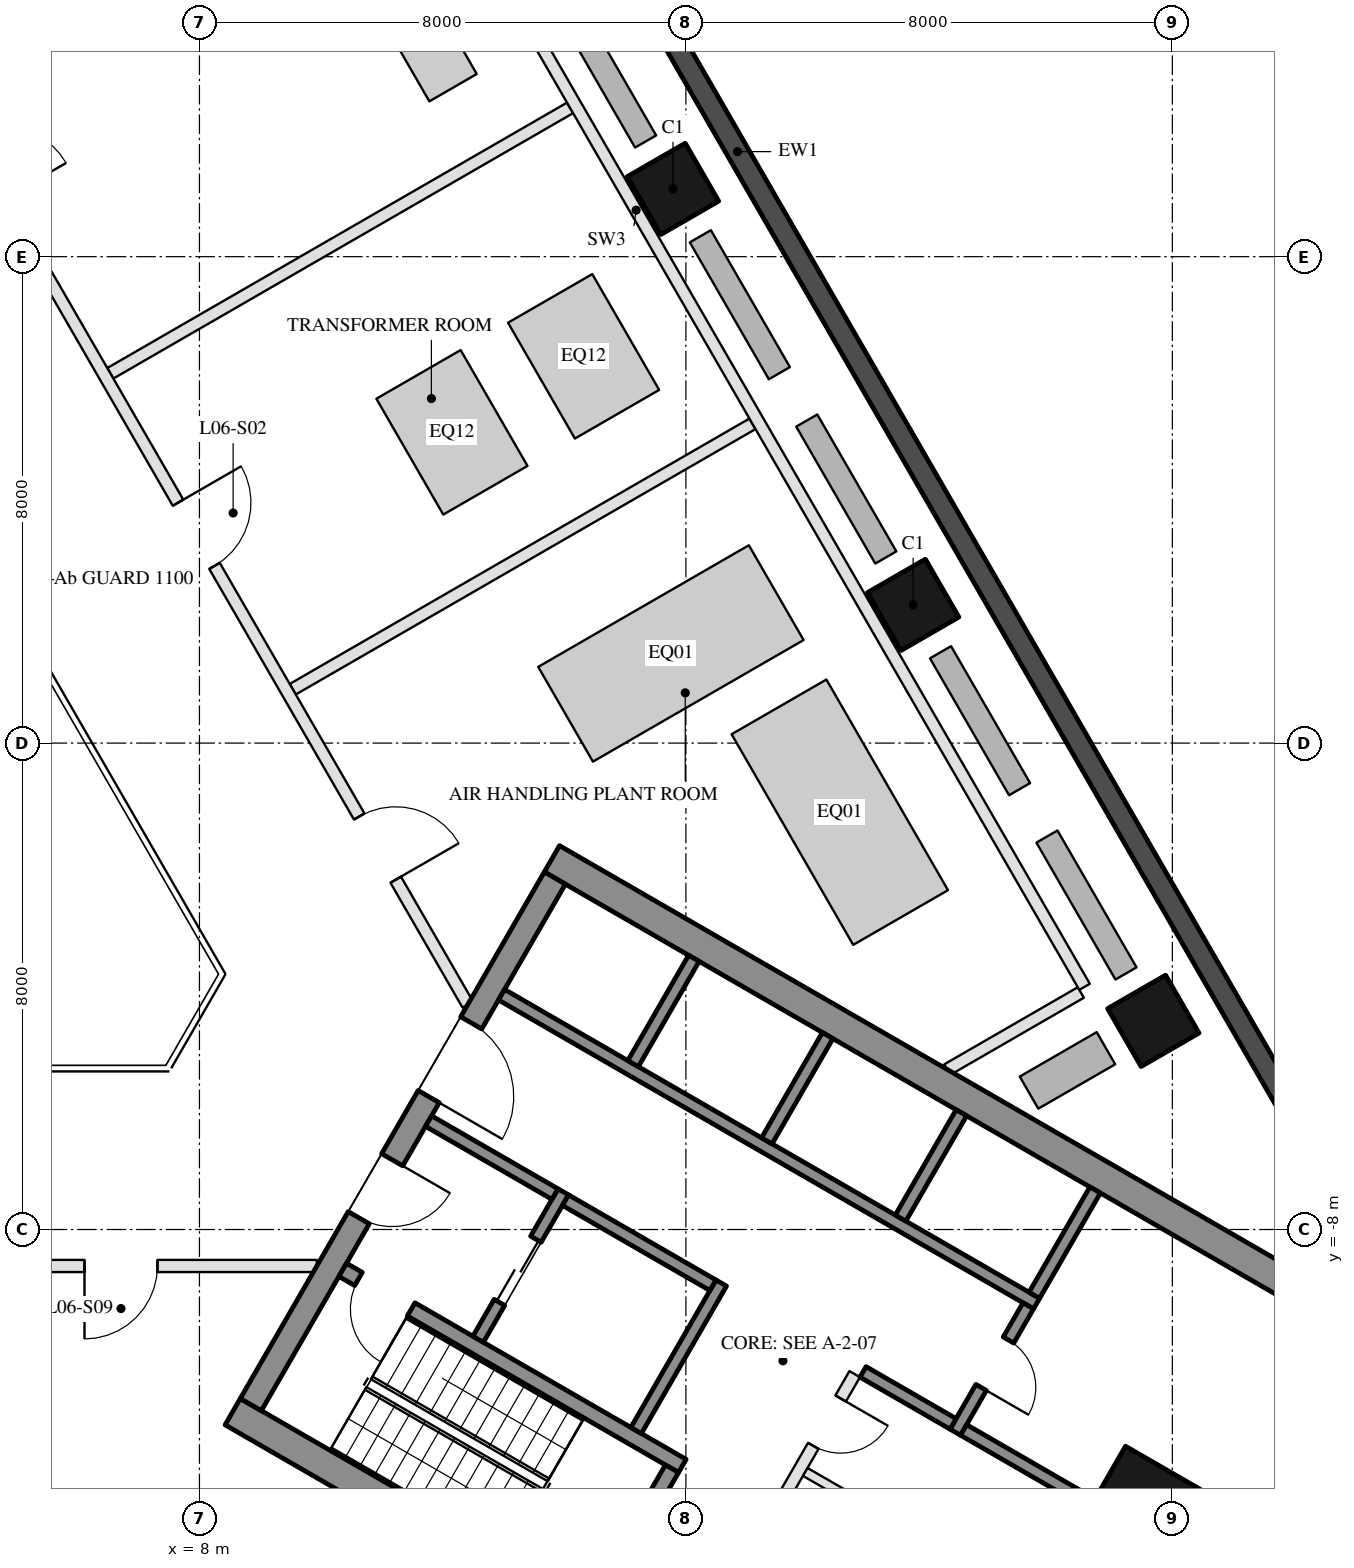
"""IFC4 building model, lengths in metres.
Left out: names, types, materials, properties, quantities, classifications, styles, units other than length and angle.
Written with IfcOpenShell. Run it as: python <this file> out.ifc"""

import sys

from ifc_helpers import new_model, si_unit, direction, frame, frame_2d, origin, origin_2d, place, context, subcontext, project, spatial, rectangle, hollow_rectangle, extrude, boolean, halfspace, element, fill, save


model = new_model("IFC4")
c1 = context("Model", 3, precision=1e-05, world=origin(), true_north=direction((0.0, 1.0)))
c2 = subcontext(c1, "Body", "Model", "MODEL_VIEW")
j1 = project(units=[si_unit("LENGTHUNIT", "METRE"), si_unit("PLANEANGLEUNIT", "RADIAN")], contexts=[c1])
p1 = place(None, origin())
s1 = spatial("IfcSite", under=j1, at=p1, CompositionType="ELEMENT")
p2 = place(p1, origin())
s2 = spatial("IfcBuilding", under=s1, at=p2, CompositionType="ELEMENT")
p3 = place(p2, frame((0.0, 0.0, 37.5)))
s3 = spatial("IfcBuildingStorey", under=s2, at=p3, CompositionType="ELEMENT", Elevation=37.5)
p4 = place(p3, frame((23.688, -4.568, 0.0), z_axis=(0.0, 0.0, 1.0), x_axis=(-0.5, 0.866025403784, 0.0)))
e1 = element("IfcColumn", 1, at=p4, inside=s3, PredefinedType="COLUMN", context=c2, shape_type="SweptSolid", body=[
    boolean("DIFFERENCE", extrude(hollow_rectangle(XDim=1.1, YDim=1.1, WallThickness=0.05, at=origin_2d()), origin(), (0.0, 0.0, 1.0), 4.5), halfspace(frame((0.0, 0.0, 0.007), z_axis=(0.0, 0.0, 1.0), x_axis=(1.0, 0.0, 0.0)), True)),
])
p5 = place(p3, frame((19.738, 2.273, 0.0), z_axis=(0.0, 0.0, 1.0), x_axis=(-0.5, 0.866025403784, 0.0)))
e2 = element("IfcColumn", 2, at=p5, inside=s3, PredefinedType="COLUMN", context=c2, shape_type="SweptSolid", body=[
    boolean("DIFFERENCE", extrude(hollow_rectangle(XDim=1.1, YDim=1.1, WallThickness=0.05, at=origin_2d()), origin(), (0.0, 0.0, 1.0), 4.5), halfspace(frame((0.0, 0.0, 0.006), z_axis=(0.0, 0.0, 1.0), x_axis=(1.0, 0.0, 0.0)), True)),
])
p6 = place(p3, frame((15.788, 9.115, 0.0), z_axis=(0.0, 0.0, 1.0), x_axis=(-0.5, 0.866025403784, 0.0)))
e3 = element("IfcColumn", 3, at=p6, inside=s3, PredefinedType="COLUMN", context=c2, shape_type="SweptSolid", body=[
    boolean("DIFFERENCE", extrude(hollow_rectangle(XDim=1.1, YDim=1.1, WallThickness=0.05, at=origin_2d()), origin(), (0.0, 0.0, 1.0), 4.5), halfspace(frame((0.0, 0.0, 0.006), z_axis=(0.0, 0.0, 1.0), x_axis=(1.0, 0.0, 0.0)), True)),
])
p7 = place(p3, frame((23.556, -13.6, 0.0), z_axis=(0.0, 0.0, 1.0), x_axis=(0.5, 0.866025403784, 0.0)))
e4 = element("IfcColumn", 4, at=p7, inside=s3, PredefinedType="COLUMN", context=c2, shape_type="SweptSolid", body=[
    extrude(hollow_rectangle(XDim=3.2, YDim=2.6, WallThickness=0.08, at=origin_2d()), origin(), (0.0, 0.0, 1.0), 4.5),
])
p8 = place(p3, frame((23.427, -16.792, 0.0), z_axis=(0.0, 0.0, 1.0), x_axis=(0.499986410639, 0.866033249463, 0.0)))
e5 = element("IfcWall", 5, at=p8, inside=s3, PredefinedType="SOLIDWALL", context=c2, shape_type="SweptSolid", body=[
    extrude(rectangle(XDim=5.658, YDim=0.35, at=frame_2d((2.829, 0.0))), origin(), (0.0, 0.0, 1.0), 4.2),
])
p9 = place(p3, frame((26.256, -6.567, 0.0), z_axis=(0.0, 0.0, 1.0), x_axis=(-0.499998380999, 0.866026338513, 0.0)))
e6 = element("IfcWall", 6, at=p9, inside=s3, PredefinedType="SOLIDWALL", context=c2, shape_type="SweptSolid", body=[
    extrude(rectangle(XDim=37.631, YDim=0.35, at=frame_2d((18.816, 0.0))), origin(), (0.0, 0.0, 1.0), 4.2),
])
for number, where, z_axis, x_axis in (
    (7, (8.547, -10.997, 0.0), (0.0, 0.0, 1.0), (0.866, -0.5, 0.0)),
    (8, (13.797, -1.903, 0.0), (0.0, 0.0, 1.0), (0.866, -0.5, 0.0)),
):
    element("IfcWall", number, at=place(p3, frame(where, z_axis=z_axis, x_axis=x_axis)), inside=s3, PredefinedType="SHEAR", context=c2, shape_type="SweptSolid", body=[
        extrude(rectangle(XDim=14.837, YDim=0.5, at=frame_2d((7.418, 0.0))), origin(), (0.0, 0.0, 1.0), 4.2),
    ])
p10 = place(p3, frame((8.845, -10.88, 0.0), z_axis=(0.0, 0.0, 1.0), x_axis=(0.500004234368, 0.866022959057, 0.0)))
e9 = element("IfcWall", 9, at=p10, inside=s3, PredefinedType="SHEAR", context=c2, shape_type="SweptSolid", body=[
    extrude(rectangle(XDim=10.0, YDim=0.4, at=frame_2d((5.0, 0.0))), origin(), (0.0, 0.0, 1.0), 4.2),
])
p11 = place(p10, frame((3.55, 0.0, 0.0)))
e10 = element("IfcOpeningElement", 10, at=p11, cuts=e9, PredefinedType="OPENING", context=c2, shape_type="SweptSolid", body=[
    extrude(rectangle(XDim=1.1, YDim=2.1, at=frame_2d((0.55, 1.05))), frame((0.0, 0.21, 0.0), z_axis=(0.0, -1.0, 0.0), x_axis=(1.0, 0.0, 0.0)), (0.0, 0.0, 1.0), 0.42),
])
p12 = place(p10, frame((5.85, 0.0, 0.0)))
e11 = element("IfcOpeningElement", 11, at=p12, cuts=e9, PredefinedType="OPENING", context=c2, shape_type="SweptSolid", body=[
    extrude(rectangle(XDim=1.4, YDim=2.1, at=frame_2d((0.7, 1.05))), frame((0.0, 0.21, 0.0), z_axis=(0.0, -1.0, 0.0), x_axis=(1.0, 0.0, 0.0)), (0.0, 0.0, 1.0), 0.42),
])
p13 = place(p3, frame((10.356, -8.664, 0.0), z_axis=(0.0, 0.0, 1.0), x_axis=(0.866028629588, -0.499994412703, 0.0)))
e12 = element("IfcWall", 12, at=p13, inside=s3, PredefinedType="SHEAR", context=c2, shape_type="SweptSolid", body=[
    extrude(rectangle(XDim=6.45, YDim=0.25, at=frame_2d((3.225, 0.0))), origin(), (0.0, 0.0, 1.0), 4.2),
])
p14 = place(p13, frame((0.3, 0.0, 0.0)))
e13 = element("IfcOpeningElement", 13, at=p14, cuts=e12, PredefinedType="OPENING", context=c2, shape_type="SweptSolid", body=[
    extrude(rectangle(XDim=1.0, YDim=2.1, at=frame_2d((0.5, 1.05))), frame((0.0, 0.135, 0.0), z_axis=(0.0, -1.0, 0.0), x_axis=(1.0, 0.0, 0.0)), (0.0, 0.0, 1.0), 0.27),
])
p15 = place(p3, frame((14.496, -14.143, 0.0), z_axis=(0.0, 0.0, 1.0), x_axis=(0.500062241894, 0.865989465428, 0.0)))
e14 = element("IfcWall", 14, at=p15, inside=s3, PredefinedType="SHEAR", context=c2, shape_type="SweptSolid", body=[
    extrude(rectangle(XDim=2.55, YDim=0.25, at=frame_2d((1.275, 0.0))), origin(), (0.0, 0.0, 1.0), 4.2),
])
p16 = place(p3, frame((15.181, -11.305, 0.0), z_axis=(0.0, 0.0, 1.0), x_axis=(0.49994636267, 0.866056369097, 0.0)))
e15 = element("IfcWall", 15, at=p16, inside=s3, PredefinedType="SHEAR", context=c2, shape_type="SweptSolid", body=[
    extrude(rectangle(XDim=2.8, YDim=0.2, at=frame_2d((1.4, 0.0))), origin(), (0.0, 0.0, 1.0), 4.2),
])
p17 = place(p3, frame((12.583, -9.805, 0.0), z_axis=(0.0, 0.0, 1.0), x_axis=(0.49994636267, 0.866056369097, 0.0)))
e16 = element("IfcWall", 16, at=p17, inside=s3, PredefinedType="SHEAR", context=c2, shape_type="SweptSolid", body=[
    extrude(rectangle(XDim=2.8, YDim=0.2, at=frame_2d((1.4, 0.0))), origin(), (0.0, 0.0, 1.0), 4.2),
])
p18 = place(p17, frame((0.7, 0.0, 0.0)))
e17 = element("IfcOpeningElement", 17, at=p18, cuts=e16, PredefinedType="OPENING", context=c2, shape_type="SweptSolid", body=[
    extrude(rectangle(XDim=1.2, YDim=2.1, at=frame_2d((0.6, 1.05))), frame((0.0, 0.11, 0.0), z_axis=(0.0, -1.0, 0.0), x_axis=(1.0, 0.0, 0.0)), (0.0, 0.0, 1.0), 0.22),
])
p19 = place(p3, frame((11.768, -6.217, 0.0), z_axis=(0.0, 0.0, 1.0), x_axis=(0.866050077142, -0.499957262057, 0.0)))
e18 = element("IfcWall", 18, at=p19, inside=s3, PredefinedType="SHEAR", context=c2, shape_type="SweptSolid", body=[
    extrude(rectangle(XDim=2.4, YDim=0.2, at=frame_2d((1.2, 0.0))), origin(), (0.0, 0.0, 1.0), 4.2),
])
p20 = place(p3, frame((14.02, -7.517, 0.0), z_axis=(0.0, 0.0, 1.0), x_axis=(0.866034573852, -0.49998411664, 0.0)))
e19 = element("IfcWall", 19, at=p20, inside=s3, PredefinedType="SHEAR", context=c2, shape_type="SweptSolid", body=[
    extrude(rectangle(XDim=2.8, YDim=0.2, at=frame_2d((1.4, 0.0))), origin(), (0.0, 0.0, 1.0), 4.2),
])
p21 = place(p3, frame((12.968, -4.138, 0.0), z_axis=(0.0, 0.0, 1.0), x_axis=(0.866028328073, -0.49999493495, 0.0)))
e20 = element("IfcWall", 20, at=p21, inside=s3, PredefinedType="SHEAR", context=c2, shape_type="SweptSolid", body=[
    extrude(rectangle(XDim=10.16, YDim=0.2, at=frame_2d((5.08, 0.0))), origin(), (0.0, 0.0, 1.0), 4.2),
])
p22 = place(p3, frame((20.43, -11.333, 0.0), z_axis=(0.0, 0.0, 1.0), x_axis=(0.500001309137, 0.866024647952, 0.0)))
e21 = element("IfcWall", 21, at=p22, inside=s3, PredefinedType="SHEAR", context=c2, shape_type="SweptSolid", body=[
    extrude(rectangle(XDim=2.4, YDim=0.2, at=frame_2d((1.2, 0.0))), origin(), (0.0, 0.0, 1.0), 4.2),
])
p23 = place(p22, frame((0.85, 0.0, 0.0)))
e22 = element("IfcOpeningElement", 22, at=p23, cuts=e21, PredefinedType="OPENING", context=c2, shape_type="SweptSolid", body=[
    extrude(rectangle(XDim=0.9, YDim=2.1, at=frame_2d((0.45, 1.05))), frame((0.0, 0.11, 0.0), z_axis=(0.0, -1.0, 0.0), x_axis=(1.0, 0.0, 0.0)), (0.0, 0.0, 1.0), 0.22),
])
p24 = place(p3, frame((18.913, -10.342, 0.0), z_axis=(0.0, 0.0, 1.0), x_axis=(0.866038183914, -0.499977863513, 0.0)))
e23 = element("IfcWall", 23, at=p24, inside=s3, PredefinedType="SHEAR", context=c2, shape_type="SweptSolid", body=[
    extrude(rectangle(XDim=1.71, YDim=0.2, at=frame_2d((0.855, 0.0))), origin(), (0.0, 0.0, 1.0), 4.2),
])
for number, where, z_axis, x_axis in (
    (24, (15.131, -5.272, 0.0), (0.0, 0.0, 1.0), (0.5, 0.866, 0.0)),
    (25, (17.331, -6.542, 0.0), (0.0, 0.0, 1.0), (0.5, 0.866, 0.0)),
    (26, (19.531, -7.812, 0.0), (0.0, 0.0, 1.0), (0.5, 0.866, 0.0)),
    (27, (21.73, -9.082, 0.0), (0.0, 0.0, 1.0), (0.5, 0.866, 0.0)),
):
    element("IfcWall", number, at=place(p3, frame(where, z_axis=z_axis, x_axis=x_axis)), inside=s3, PredefinedType="SHEAR", context=c2, shape_type="SweptSolid", body=[
        extrude(rectangle(XDim=2.0, YDim=0.2, at=frame_2d((1.0, 0.0))), origin(), (0.0, 0.0, 1.0), 4.2),
    ])
p25 = place(p3, frame((20.567, -11.297, 0.0), z_axis=(0.0, 0.0, 1.0), x_axis=(0.866048967903, -0.499959183527, 0.0)))
e28 = element("IfcWall", 28, at=p25, inside=s3, PredefinedType="SHEAR", context=c2, shape_type="SweptSolid", body=[
    extrude(rectangle(XDim=2.44, YDim=0.2, at=frame_2d((1.22, 0.0))), origin(), (0.0, 0.0, 1.0), 4.2),
])
p26 = place(p3, frame((16.076, -15.055, 0.0), z_axis=(0.0, 0.0, 1.0), x_axis=(0.499995103361, 0.866028230842, 0.0)))
e29 = element("IfcWall", 29, at=p26, inside=s3, PredefinedType="PARTITIONING", context=c2, shape_type="SweptSolid", body=[
    extrude(rectangle(XDim=5.4, YDim=0.2, at=frame_2d((2.7, 0.0))), origin(), (0.0, 0.0, 1.0), 4.2),
])
p27 = place(p26, frame((2.163, 0.0, 0.0)))
e30 = element("IfcOpeningElement", 30, at=p27, cuts=e29, PredefinedType="OPENING", context=c2, shape_type="SweptSolid", body=[
    extrude(rectangle(XDim=0.9, YDim=2.1, at=frame_2d((0.45, 1.05))), frame((0.0, 0.11, 0.0), z_axis=(0.0, -1.0, 0.0), x_axis=(1.0, 0.0, 0.0)), (0.0, 0.0, 1.0), 0.22),
])
p28 = place(p26, frame((4.038, 0.0, 0.0)))
e31 = element("IfcOpeningElement", 31, at=p28, cuts=e29, PredefinedType="OPENING", context=c2, shape_type="SweptSolid", body=[
    extrude(rectangle(XDim=0.9, YDim=2.1, at=frame_2d((0.45, 1.05))), frame((0.0, 0.11, 0.0), z_axis=(0.0, -1.0, 0.0), x_axis=(1.0, 0.0, 0.0)), (0.0, 0.0, 1.0), 0.22),
])
p29 = place(p3, frame((17.963, -11.987, 0.0), z_axis=(0.0, 0.0, 1.0), x_axis=(0.866013608182, -0.500020430026, 0.0)))
e32 = element("IfcWall", 32, at=p29, inside=s3, PredefinedType="PARTITIONING", context=c2, shape_type="SweptSolid", body=[
    extrude(rectangle(XDim=4.35, YDim=0.15, at=frame_2d((2.175, 0.0))), origin(), (0.0, 0.0, 1.0), 4.2),
])
p30 = place(p3, frame((-9.93, -8.6, 0.0), z_axis=(0.0, 0.0, 1.0), x_axis=(1.0, 0.0, 0.0)))
e33 = element("IfcWall", 33, at=p30, inside=s3, PredefinedType="PARTITIONING", context=c2, shape_type="SweptSolid", body=[
    extrude(rectangle(XDim=19.861, YDim=0.2, at=frame_2d((9.93, 0.0))), origin(), (0.0, 0.0, 1.0), 3.41),
])
p31 = place(p30, frame((2.871, 0.0, 0.0)))
e34 = element("IfcOpeningElement", 34, at=p31, cuts=e33, PredefinedType="OPENING", context=c2, shape_type="SweptSolid", body=[
    extrude(rectangle(XDim=1.2, YDim=2.1, at=frame_2d((0.6, 1.05))), frame((0.0, 0.11, 0.0), z_axis=(0.0, -1.0, 0.0), x_axis=(1.0, 0.0, 0.0)), (0.0, 0.0, 1.0), 0.22),
])
p32 = place(p30, frame((9.581, 0.0, 0.0)))
e35 = element("IfcOpeningElement", 35, at=p32, cuts=e33, PredefinedType="OPENING", context=c2, shape_type="SweptSolid", body=[
    extrude(rectangle(XDim=1.2, YDim=2.1, at=frame_2d((0.6, 1.05))), frame((0.0, 0.11, 0.0), z_axis=(0.0, -1.0, 0.0), x_axis=(1.0, 0.0, 0.0)), (0.0, 0.0, 1.0), 0.22),
])
p33 = place(p30, frame((16.04, 0.0, 0.0)))
e36 = element("IfcOpeningElement", 36, at=p33, cuts=e33, PredefinedType="OPENING", context=c2, shape_type="SweptSolid", body=[
    extrude(rectangle(XDim=1.2, YDim=2.1, at=frame_2d((0.6, 1.05))), frame((0.0, 0.11, 0.0), z_axis=(0.0, -1.0, 0.0), x_axis=(1.0, 0.0, 0.0)), (0.0, 0.0, 1.0), 0.22),
])
p34 = place(p3, frame((22.495, -4.102, 0.0), z_axis=(0.0, 0.0, 1.0), x_axis=(-0.866065287345, -0.499930913282, 0.0)))
e37 = element("IfcWall", 37, at=p34, inside=s3, PredefinedType="PARTITIONING", context=c2, shape_type="SweptSolid", body=[
    extrude(rectangle(XDim=2.534, YDim=0.2, at=frame_2d((1.267, 0.0))), origin(), (0.0, 0.0, 1.0), 4.2),
])
p35 = place(p3, frame((17.095, 5.251, 0.0), z_axis=(0.0, 0.0, 1.0), x_axis=(-0.866023051915, -0.500004073536, 0.0)))
e38 = element("IfcWall", 38, at=p35, inside=s3, PredefinedType="PARTITIONING", context=c2, shape_type="SweptSolid", body=[
    extrude(rectangle(XDim=8.73, YDim=0.2, at=frame_2d((4.365, 0.0))), origin(), (0.0, 0.0, 1.0), 3.41),
])
p36 = place(p3, frame((14.095, 10.447, 0.0), z_axis=(0.0, 0.0, 1.0), x_axis=(-0.866023051915, -0.500004073536, 0.0)))
e39 = element("IfcWall", 39, at=p36, inside=s3, PredefinedType="PARTITIONING", context=c2, shape_type="SweptSolid", body=[
    extrude(rectangle(XDim=8.73, YDim=0.2, at=frame_2d((4.365, 0.0))), origin(), (0.0, 0.0, 1.0), 4.2),
])
p37 = place(p3, frame((22.556, -4.009, 0.0), z_axis=(0.0, 0.0, 1.0), x_axis=(-0.500002084189, 0.866024200474, 0.0)))
e40 = element("IfcWall", 40, at=p37, inside=s3, PredefinedType="PARTITIONING", context=c2, shape_type="SweptSolid", body=[
    extrude(rectangle(XDim=29.5, YDim=0.2, at=frame_2d((14.75, 0.0))), origin(), (0.0, 0.0, 1.0), 3.41),
])
p38 = place(p3, frame((12.413, -4.3, 0.0), z_axis=(0.0, 0.0, 1.0), x_axis=(-0.50000478328, 0.866022642139, 0.0)))
e41 = element("IfcWall", 41, at=p38, inside=s3, PredefinedType="PARTITIONING", context=c2, shape_type="SweptSolid", body=[
    extrude(rectangle(XDim=19.861, YDim=0.2, at=frame_2d((9.931, 0.0))), origin(), (0.0, 0.0, 1.0), 3.41),
])
p39 = place(p38, frame((2.371, 0.0, 0.0)))
e42 = element("IfcOpeningElement", 42, at=p39, cuts=e41, PredefinedType="OPENING", context=c2, shape_type="SweptSolid", body=[
    extrude(rectangle(XDim=1.2, YDim=2.1, at=frame_2d((0.6, 1.05))), frame((0.0, 0.11, 0.0), z_axis=(0.0, -1.0, 0.0), x_axis=(1.0, 0.0, 0.0)), (0.0, 0.0, 1.0), 0.22),
])
p40 = place(p38, frame((8.331, 0.0, 0.0)))
e43 = element("IfcOpeningElement", 43, at=p40, cuts=e41, PredefinedType="OPENING", context=c2, shape_type="SweptSolid", body=[
    extrude(rectangle(XDim=1.2, YDim=2.1, at=frame_2d((0.6, 1.05))), frame((0.0, 0.11, 0.0), z_axis=(0.0, -1.0, 0.0), x_axis=(1.0, 0.0, 0.0)), (0.0, 0.0, 1.0), 0.22),
])
p41 = place(p38, frame((15.29, 0.0, 0.0)))
e44 = element("IfcOpeningElement", 44, at=p41, cuts=e41, PredefinedType="OPENING", context=c2, shape_type="SweptSolid", body=[
    extrude(rectangle(XDim=1.2, YDim=2.1, at=frame_2d((0.6, 1.05))), frame((0.0, 0.11, 0.0), z_axis=(0.0, -1.0, 0.0), x_axis=(1.0, 0.0, 0.0)), (0.0, 0.0, 1.0), 0.22),
])
p42 = place(p18, origin())
e45 = element("IfcDoor", 45, at=p42, inside=s3, OperationType="DOUBLE_DOOR_SLIDING", PredefinedType="DOOR", context=c2, shape_type="SweptSolid", body=[
    extrude(rectangle(XDim=1.2, YDim=2.1, at=frame_2d((0.6, 1.05))), frame((0.0, 0.025, 0.0), z_axis=(0.0, -1.0, 0.0), x_axis=(1.0, 0.0, 0.0)), (0.0, 0.0, 1.0), 0.05),
])
fill(e17, e45)
p43 = place(p23, frame((0.9, 0.0, 0.0), z_axis=(0.0, 0.0, 1.0), x_axis=(-1.0, 0.0, 0.0)))
e46 = element("IfcDoor", 46, at=p43, inside=s3, OperationType="SINGLE_SWING_RIGHT", PredefinedType="DOOR", context=c2, shape_type="SweptSolid", body=[
    extrude(rectangle(XDim=0.9, YDim=2.1, at=frame_2d((0.45, 1.05))), frame((0.0, 0.025, 0.0), z_axis=(0.0, -1.0, 0.0), x_axis=(1.0, 0.0, 0.0)), (0.0, 0.0, 1.0), 0.05),
])
fill(e22, e46)
p44 = place(p28, frame((0.9, 0.0, 0.0), z_axis=(0.0, 0.0, 1.0), x_axis=(-1.0, 0.0, 0.0)))
e47 = element("IfcDoor", 47, at=p44, inside=s3, OperationType="SINGLE_SWING_LEFT", PredefinedType="DOOR", context=c2, shape_type="SweptSolid", body=[
    extrude(rectangle(XDim=0.9, YDim=2.1, at=frame_2d((0.45, 1.05))), frame((0.0, 0.025, 0.0), z_axis=(0.0, -1.0, 0.0), x_axis=(1.0, 0.0, 0.0)), (0.0, 0.0, 1.0), 0.05),
])
fill(e31, e47)
p45 = place(p11, frame((1.1, 0.0, 0.0), z_axis=(0.0, 0.0, 1.0), x_axis=(-1.0, 0.0, 0.0)))
e48 = element("IfcDoor", 48, at=p45, inside=s3, OperationType="SINGLE_SWING_LEFT", PredefinedType="DOOR", context=c2, shape_type="SweptSolid", body=[
    extrude(rectangle(XDim=1.1, YDim=2.1, at=frame_2d((0.55, 1.05))), frame((0.0, 0.025, 0.0), z_axis=(0.0, -1.0, 0.0), x_axis=(1.0, 0.0, 0.0)), (0.0, 0.0, 1.0), 0.05),
])
fill(e10, e48)
p46 = place(p12, frame((1.4, 0.0, 0.0), z_axis=(0.0, 0.0, 1.0), x_axis=(-1.0, 0.0, 0.0)))
e49 = element("IfcDoor", 49, at=p46, inside=s3, OperationType="DOUBLE_DOOR_SINGLE_SWING", PredefinedType="DOOR", context=c2, shape_type="SweptSolid", body=[
    extrude(rectangle(XDim=1.4, YDim=2.1, at=frame_2d((0.7, 1.05))), frame((0.0, 0.025, 0.0), z_axis=(0.0, -1.0, 0.0), x_axis=(1.0, 0.0, 0.0)), (0.0, 0.0, 1.0), 0.05),
])
fill(e11, e49)
p47 = place(p14, frame((1.0, 0.0, 0.0), z_axis=(0.0, 0.0, 1.0), x_axis=(-1.0, 0.0, 0.0)))
e50 = element("IfcDoor", 50, at=p47, inside=s3, OperationType="SINGLE_SWING_LEFT", PredefinedType="DOOR", context=c2, shape_type="SweptSolid", body=[
    extrude(rectangle(XDim=1.0, YDim=2.1, at=frame_2d((0.5, 1.05))), frame((0.0, 0.025, 0.0), z_axis=(0.0, -1.0, 0.0), x_axis=(1.0, 0.0, 0.0)), (0.0, 0.0, 1.0), 0.05),
])
fill(e13, e50)
p48 = place(p39, frame((1.2, 0.0, 0.0), z_axis=(0.0, 0.0, 1.0), x_axis=(-1.0, 0.0, 0.0)))
e51 = element("IfcDoor", 51, at=p48, inside=s3, OperationType="SINGLE_SWING_RIGHT", PredefinedType="DOOR", context=c2, shape_type="SweptSolid", body=[
    extrude(rectangle(XDim=1.2, YDim=2.1, at=frame_2d((0.6, 1.05))), frame((0.0, 0.025, 0.0), z_axis=(0.0, -1.0, 0.0), x_axis=(1.0, 0.0, 0.0)), (0.0, 0.0, 1.0), 0.05),
])
fill(e42, e51)
p49 = place(p40, frame((1.2, 0.0, 0.0), z_axis=(0.0, 0.0, 1.0), x_axis=(-1.0, 0.0, 0.0)))
e52 = element("IfcDoor", 52, at=p49, inside=s3, OperationType="SINGLE_SWING_LEFT", PredefinedType="DOOR", context=c2, shape_type="SweptSolid", body=[
    extrude(rectangle(XDim=1.2, YDim=2.1, at=frame_2d((0.6, 1.05))), frame((0.0, 0.025, 0.0), z_axis=(0.0, -1.0, 0.0), x_axis=(1.0, 0.0, 0.0)), (0.0, 0.0, 1.0), 0.05),
])
fill(e43, e52)
p50 = place(p33, frame((1.2, 0.0, 0.0), z_axis=(0.0, 0.0, 1.0), x_axis=(-1.0, 0.0, 0.0)))
e53 = element("IfcDoor", 53, at=p50, inside=s3, OperationType="SINGLE_SWING_RIGHT", PredefinedType="DOOR", context=c2, shape_type="SweptSolid", body=[
    extrude(rectangle(XDim=1.2, YDim=2.1, at=frame_2d((0.6, 1.05))), frame((0.0, 0.025, 0.0), z_axis=(0.0, -1.0, 0.0), x_axis=(1.0, 0.0, 0.0)), (0.0, 0.0, 1.0), 0.05),
])
fill(e36, e53)
save(model, sys.argv[1])
